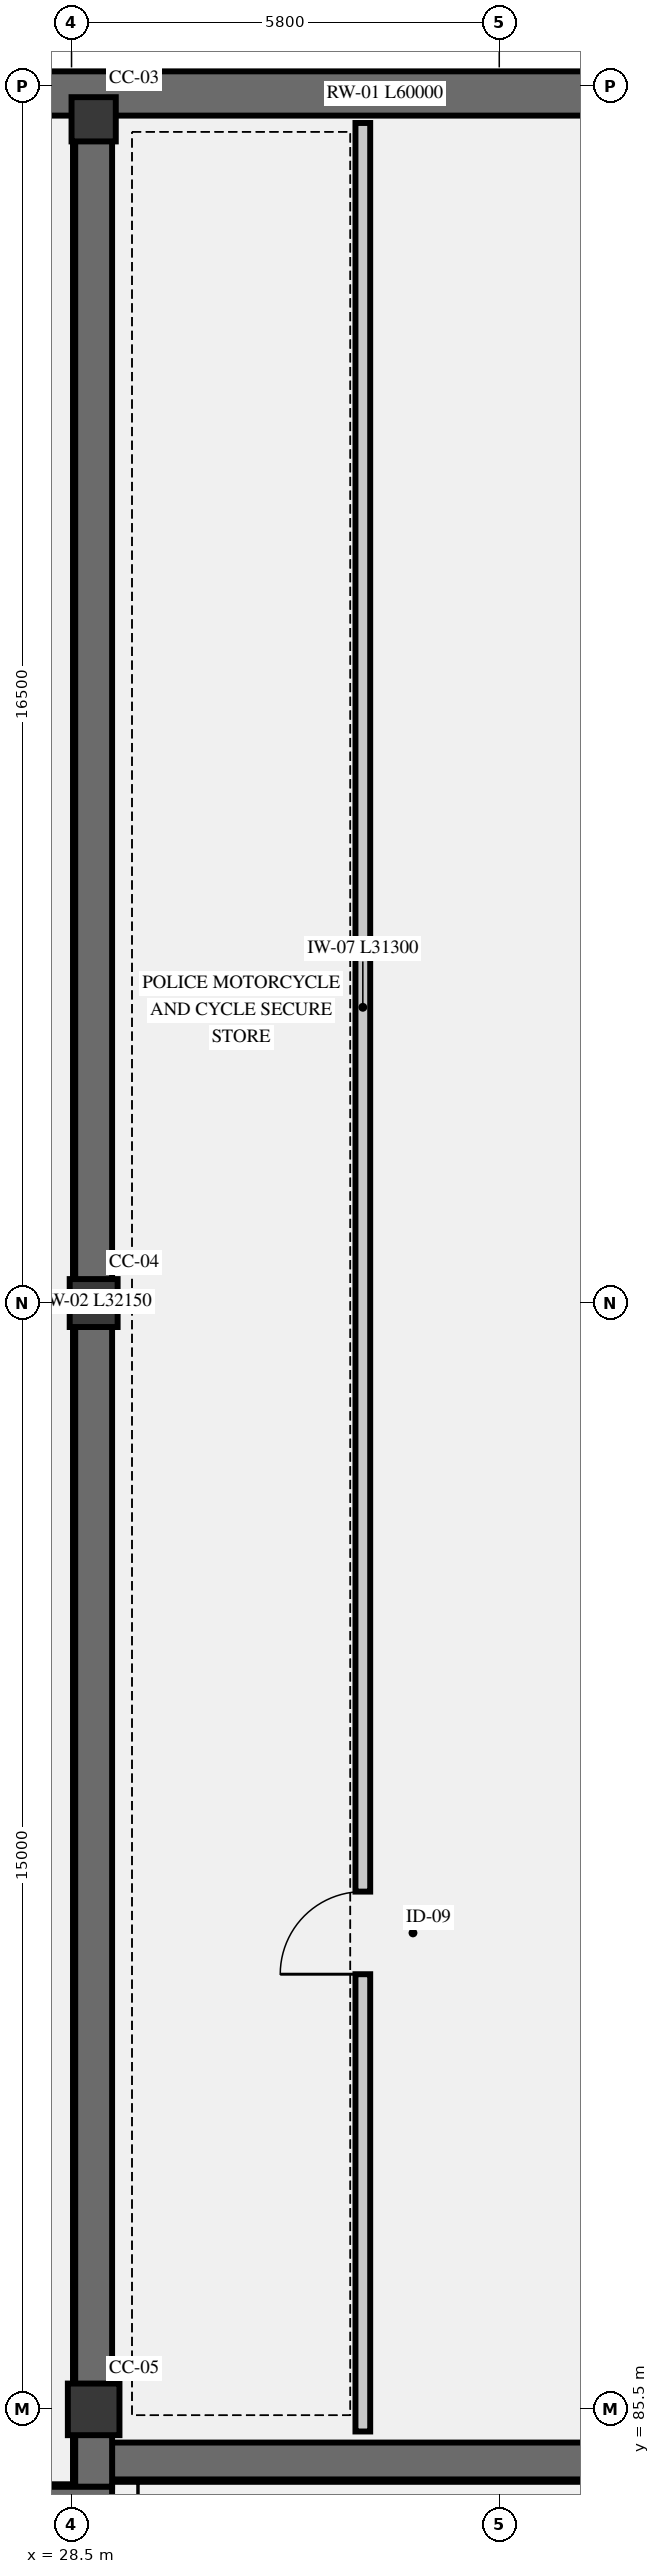
"""IFC4 building model, lengths in metres.
Left out: names, types, materials, properties, quantities, classifications, styles, units other than length and angle.
Written with IfcOpenShell. Run it as: python <this file> out.ifc"""

import sys

from ifc_helpers import new_model, si_unit, direction, frame, frame_2d, origin, origin_2d, place, context, subcontext, project, spatial, rectangle, extrude, element, fill, save


model = new_model("IFC4")
c1 = context("Model", 3, precision=1e-05, world=origin(), true_north=direction((0.0, 1.0)))
c2 = subcontext(c1, "Body", "Model", "MODEL_VIEW")
j1 = project(units=[si_unit("LENGTHUNIT", "METRE"), si_unit("PLANEANGLEUNIT", "RADIAN")], contexts=[c1])
p1 = place(None, origin())
s1 = spatial("IfcSite", under=j1, at=p1, CompositionType="ELEMENT")
p2 = place(p1, origin())
s2 = spatial("IfcBuilding", under=s1, at=p2, CompositionType="ELEMENT")
p3 = place(p2, frame((0.0, 0.0, -8.4)))
s3 = spatial("IfcBuildingStorey", under=s2, at=p3, CompositionType="ELEMENT", Elevation=-8.4)
p4 = place(p3, frame((4.5, 116.9, 0.0), z_axis=(0.0, 0.0, 1.0), x_axis=(1.0, 0.0, 0.0)))
e1 = element("IfcWall", 1, at=p4, inside=s3, PredefinedType="USERDEFINED", context=c2, shape_type="SweptSolid", body=[
    extrude(rectangle(XDim=60.0, YDim=0.6, at=frame_2d((30.0, 0.0))), origin(), (0.0, 0.0, 1.0), 4.2),
])
p5 = place(p3, frame((29.05, 84.8, 0.0), z_axis=(0.0, 0.0, 1.0), x_axis=(1.0, 0.0, 0.0)))
e2 = element("IfcWall", 2, at=p5, inside=s3, PredefinedType="USERDEFINED", context=c2, shape_type="SweptSolid", body=[
    extrude(rectangle(XDim=94.35, YDim=0.5, at=frame_2d((47.175, 0.0))), origin(), (0.0, 0.0, 1.0), 3.92),
])
p6 = place(p5, frame((55.8, 0.0, 0.0)))
e3 = element("IfcOpeningElement", 3, at=p6, cuts=e2, PredefinedType="OPENING", context=c2, shape_type="SweptSolid", body=[
    extrude(rectangle(XDim=1.18, YDim=2.24, at=frame_2d((0.59, 1.12))), frame((0.0, 0.26, 0.0), z_axis=(0.0, -1.0, 0.0), x_axis=(1.0, 0.0, 0.0)), (0.0, 0.0, 1.0), 0.52),
])
p7 = place(p3, frame((28.8, 84.45, 0.0), z_axis=(0.0, 0.0, 1.0), x_axis=(0.0, 1.0, 0.0)))
e4 = element("IfcWall", 4, at=p7, inside=s3, PredefinedType="USERDEFINED", context=c2, shape_type="SweptSolid", body=[
    extrude(rectangle(XDim=32.15, YDim=0.5, at=frame_2d((16.075, 0.0))), origin(), (0.0, 0.0, 1.0), 3.92),
])
p8 = place(p3, frame((5.1, 84.2, 0.0), z_axis=(0.0, 0.0, 1.0), x_axis=(1.0, 0.0, 0.0)))
e5 = element("IfcWall", 5, at=p8, inside=s3, PredefinedType="USERDEFINED", context=c2, shape_type="SweptSolid", body=[
    extrude(rectangle(XDim=23.95, YDim=0.5, at=frame_2d((11.975, 0.0))), origin(), (0.0, 0.0, 1.0), 3.92),
])
p9 = place(p3, frame((28.8, 85.5, -0.44), z_axis=(0.0, 0.0, 1.0), x_axis=(1.0, 0.0, 0.0)))
e6 = element("IfcColumn", 6, at=p9, inside=s3, PredefinedType="COLUMN", context=c2, shape_type="SweptSolid", body=[
    extrude(rectangle(XDim=0.7, YDim=0.7, at=origin_2d()), origin(), (0.0, 0.0, 1.0), 4.64),
])
p10 = place(p3, frame((28.8, 100.5, -0.44), z_axis=(0.0, 0.0, 1.0), x_axis=(1.0, 0.0, 0.0)))
e7 = element("IfcColumn", 7, at=p10, inside=s3, PredefinedType="COLUMN", context=c2, shape_type="SweptSolid", body=[
    extrude(rectangle(XDim=0.65, YDim=0.65, at=origin_2d()), origin(), (0.0, 0.0, 1.0), 4.64),
])
p11 = place(p3, frame((28.8, 116.55, -0.44), z_axis=(0.0, 0.0, 1.0), x_axis=(1.0, 0.0, 0.0)))
e8 = element("IfcColumn", 8, at=p11, inside=s3, PredefinedType="COLUMN", context=c2, shape_type="SweptSolid", body=[
    extrude(rectangle(XDim=0.6, YDim=0.6, at=origin_2d()), origin(), (0.0, 0.0, 1.0), 4.64),
])
p12 = place(p3, frame((32.45, 85.2, 0.0), z_axis=(0.0, 0.0, 1.0), x_axis=(0.0, 1.0, 0.0)))
e9 = element("IfcWall", 9, at=p12, inside=s3, PredefinedType="PARTITIONING", context=c2, shape_type="SweptSolid", body=[
    extrude(rectangle(XDim=31.3, YDim=0.2, at=frame_2d((15.65, 0.0))), origin(), (0.0, 0.0, 1.0), 3.108),
])
p13 = place(p12, frame((6.2, 0.0, 0.0)))
e10 = element("IfcOpeningElement", 10, at=p13, cuts=e9, PredefinedType="OPENING", context=c2, shape_type="SweptSolid", body=[
    extrude(rectangle(XDim=1.12, YDim=2.2, at=frame_2d((0.56, 1.1))), frame((0.0, 0.11, 0.0), z_axis=(0.0, -1.0, 0.0), x_axis=(1.0, 0.0, 0.0)), (0.0, 0.0, 1.0), 0.22),
])
p14 = place(p13, origin())
e11 = element("IfcDoor", 11, at=p14, inside=s3, OperationType="SINGLE_SWING_LEFT", PredefinedType="DOOR", context=c2, shape_type="SweptSolid", body=[
    extrude(rectangle(XDim=1.12, YDim=2.2, at=frame_2d((0.56, 1.1))), frame((0.0, 0.025, 0.0), z_axis=(0.0, -1.0, 0.0), x_axis=(1.0, 0.0, 0.0)), (0.0, 0.0, 1.0), 0.05),
])
fill(e10, e11)
save(model, sys.argv[1])
